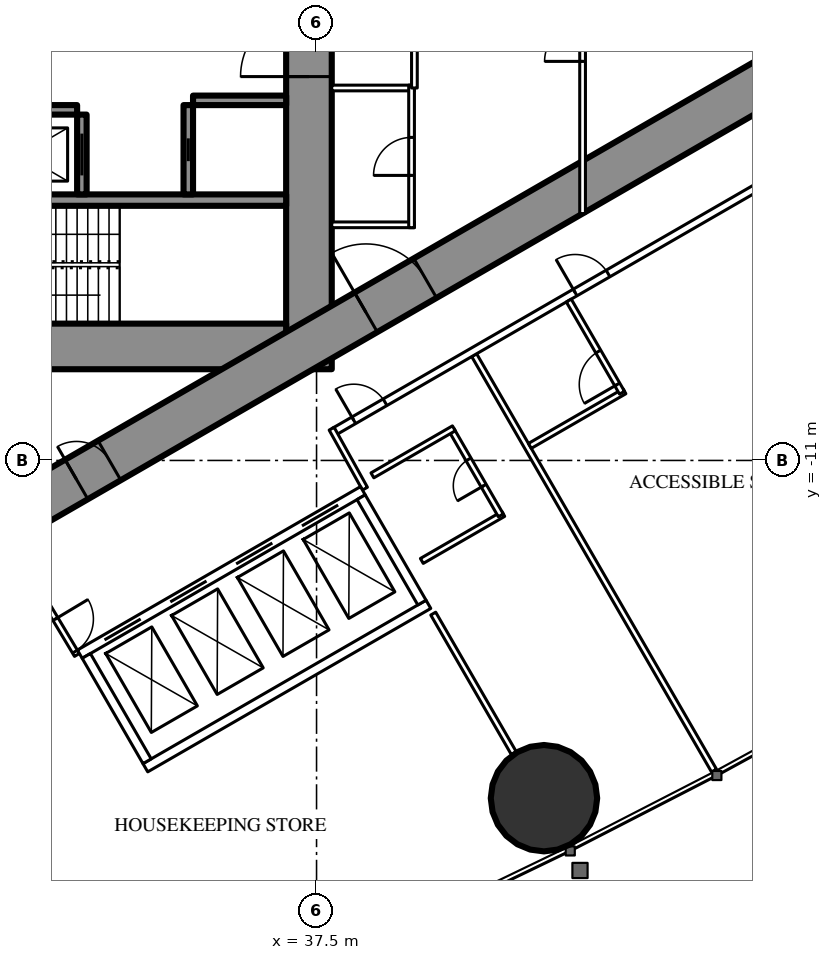
"""IFC4 building model, lengths in metres.
Left out: names, types, materials, properties, quantities, classifications, styles, units other than length and angle.
Written with IfcOpenShell. Run it as: python <this file> out.ifc"""

import sys

from ifc_helpers import new_model, si_unit, direction, frame, frame_2d, origin, origin_2d, place, context, subcontext, project, spatial, rectangle, hollow_circle, extrude, element, fill, save


model = new_model("IFC4")
c1 = context("Model", 3, precision=1e-05, world=origin(), true_north=direction((0.0, 1.0)))
c2 = subcontext(c1, "Body", "Model", "MODEL_VIEW")
j1 = project(units=[si_unit("LENGTHUNIT", "METRE"), si_unit("PLANEANGLEUNIT", "RADIAN")], contexts=[c1])
p1 = place(None, origin())
s1 = spatial("IfcSite", under=j1, at=p1, CompositionType="ELEMENT")
p2 = place(p1, origin())
s2 = spatial("IfcBuilding", under=s1, at=p2, CompositionType="ELEMENT")
p3 = place(p2, frame((0.0, 0.0, 39.0)))
s3 = spatial("IfcBuildingStorey", under=s2, at=p3, CompositionType="ELEMENT", Elevation=39.0)
p4 = place(p3, frame((43.484, -19.886, 0.0), z_axis=(0.0, 0.0, 1.0), x_axis=(1.0, 0.0, 0.0)))
e1 = element("IfcColumn", 1, at=p4, inside=s3, PredefinedType="COLUMN", context=c2, shape_type="SweptSolid", body=[
    extrude(hollow_circle(Radius=1.4, WallThickness=0.12, at=origin_2d()), origin(), (0.0, 0.0, 1.0), 3.5),
])
p5 = place(p3, frame((37.3, -8.6, 0.0), z_axis=(0.0, 0.0, 1.0), x_axis=(0.0, 1.0, 0.0)))
e2 = element("IfcWall", 2, at=p5, inside=s3, PredefinedType="SHEAR", context=c2, shape_type="SweptSolid", body=[
    extrude(rectangle(XDim=17.2, YDim=1.2, at=frame_2d((8.6, 0.0))), origin(), (0.0, 0.0, 1.0), 3.5),
])
p6 = place(p5, frame((7.7, 0.0, 0.0)))
e3 = element("IfcOpeningElement", 3, at=p6, cuts=e2, PredefinedType="OPENING", context=c2, shape_type="SweptSolid", body=[
    extrude(rectangle(XDim=1.8, YDim=2.2, at=frame_2d((0.9, 1.1))), frame((0.0, 0.61, 0.0), z_axis=(0.0, -1.0, 0.0), x_axis=(1.0, 0.0, 0.0)), (0.0, 0.0, 1.0), 1.22),
])
p7 = place(p3, frame((28.3, -8.0, 0.0), z_axis=(0.0, 0.0, 1.0), x_axis=(1.0, 0.0, 0.0)))
e4 = element("IfcWall", 4, at=p7, inside=s3, PredefinedType="SHEAR", context=c2, shape_type="SweptSolid", body=[
    extrude(rectangle(XDim=8.4, YDim=1.2, at=frame_2d((4.2, 0.0))), origin(), (0.0, 0.0, 1.0), 3.5),
])
p8 = place(p7, frame((0.25, 0.0, 0.0)))
e5 = element("IfcOpeningElement", 5, at=p8, cuts=e4, PredefinedType="OPENING", context=c2, shape_type="SweptSolid", body=[
    extrude(rectangle(XDim=1.0, YDim=2.2, at=frame_2d((0.5, 1.1))), frame((0.0, 0.61, 0.0), z_axis=(0.0, -1.0, 0.0), x_axis=(1.0, 0.0, 0.0)), (0.0, 0.0, 1.0), 1.22),
])
p9 = place(p3, frame((28.3, -4.15, 0.0), z_axis=(0.0, 0.0, 1.0), x_axis=(1.0, 0.0, 0.0)))
e6 = element("IfcWall", 6, at=p9, inside=s3, PredefinedType="SHEAR", context=c2, shape_type="SweptSolid", body=[
    extrude(rectangle(XDim=8.4, YDim=0.3, at=frame_2d((4.2, 0.0))), origin(), (0.0, 0.0, 1.0), 3.5),
])
p10 = place(p3, frame((31.325, -4.0, 0.0), z_axis=(0.0, 0.0, 1.0), x_axis=(0.0, 1.0, 0.0)))
e7 = element("IfcWall", 7, at=p10, inside=s3, PredefinedType="SHEAR", context=c2, shape_type="SweptSolid", body=[
    extrude(rectangle(XDim=2.1, YDim=0.25, at=frame_2d((1.05, 0.0))), origin(), (0.0, 0.0, 1.0), 3.5),
])
p11 = place(p10, frame((0.5, 0.0, 0.0)))
e8 = element("IfcOpeningElement", 8, at=p11, cuts=e7, PredefinedType="OPENING", context=c2, shape_type="SweptSolid", body=[
    extrude(rectangle(XDim=1.1, YDim=2.2, at=frame_2d((0.55, 1.1))), frame((0.0, 0.135, 0.0), z_axis=(0.0, -1.0, 0.0), x_axis=(1.0, 0.0, 0.0)), (0.0, 0.0, 1.0), 0.27),
])
p12 = place(p3, frame((34.125, -4.0, 0.0), z_axis=(0.0, 0.0, 1.0), x_axis=(0.0, 1.0, 0.0)))
e9 = element("IfcWall", 9, at=p12, inside=s3, PredefinedType="SHEAR", context=c2, shape_type="SweptSolid", body=[
    extrude(rectangle(XDim=2.35, YDim=0.25, at=frame_2d((1.175, 0.0))), origin(), (0.0, 0.0, 1.0), 3.5),
])
p13 = place(p12, frame((0.875, 0.0, 0.0)))
e10 = element("IfcOpeningElement", 10, at=p13, cuts=e9, PredefinedType="OPENING", context=c2, shape_type="SweptSolid", body=[
    extrude(rectangle(XDim=0.6, YDim=2.0, at=frame_2d((0.3, 1.0))), frame((0.0, 0.135, 0.0), z_axis=(0.0, -1.0, 0.0), x_axis=(1.0, 0.0, 0.0)), (0.0, 0.0, 1.0), 0.27),
])
p14 = place(p3, frame((28.3, -1.775, 0.0), z_axis=(0.0, 0.0, 1.0), x_axis=(1.0, 0.0, 0.0)))
e11 = element("IfcWall", 11, at=p14, inside=s3, PredefinedType="SHEAR", context=c2, shape_type="SweptSolid", body=[
    extrude(rectangle(XDim=2.9, YDim=0.25, at=frame_2d((1.45, 0.0))), origin(), (0.0, 0.0, 1.0), 3.5),
])
p15 = place(p3, frame((34.25, -1.525, 0.0), z_axis=(0.0, 0.0, 1.0), x_axis=(1.0, 0.0, 0.0)))
e12 = element("IfcWall", 12, at=p15, inside=s3, PredefinedType="SHEAR", context=c2, shape_type="SweptSolid", body=[
    extrude(rectangle(XDim=2.45, YDim=0.25, at=frame_2d((1.225, 0.0))), origin(), (0.0, 0.0, 1.0), 3.5),
])
p16 = place(p3, frame((27.2, -13.8, 0.0), z_axis=(0.0, 0.0, 1.0), x_axis=(0.866027159892, 0.499996958321, 0.0)))
e13 = element("IfcWall", 13, at=p16, inside=s3, PredefinedType="SHEAR", context=c2, shape_type="SweptSolid", body=[
    extrude(rectangle(XDim=27.947, YDim=1.2, at=frame_2d((13.973, 0.0))), origin(), (0.0, 0.0, 1.0), 3.5),
])
p17 = place(p16, frame((4.6, 0.0, 0.0)))
e14 = element("IfcOpeningElement", 14, at=p17, cuts=e13, PredefinedType="OPENING", context=c2, shape_type="SweptSolid", body=[
    extrude(rectangle(XDim=1.0, YDim=2.2, at=frame_2d((0.5, 1.1))), frame((0.0, 0.61, 0.0), z_axis=(0.0, -1.0, 0.0), x_axis=(1.0, 0.0, 0.0)), (0.0, 0.0, 1.0), 1.22),
])
p18 = place(p16, frame((13.395, 0.0, 0.0)))
e15 = element("IfcOpeningElement", 15, at=p18, cuts=e13, PredefinedType="OPENING", context=c2, shape_type="SweptSolid", body=[
    extrude(rectangle(XDim=1.8, YDim=2.2, at=frame_2d((0.9, 1.1))), frame((0.0, 0.61, 0.0), z_axis=(0.0, -1.0, 0.0), x_axis=(1.0, 0.0, 0.0)), (0.0, 0.0, 1.0), 1.22),
])
p19 = place(p3, frame((41.647, -8.23, 0.0), z_axis=(0.0, 0.0, 1.0), x_axis=(0.49998590462, -0.866033541603, 0.0)))
e16 = element("IfcWall", 16, at=p19, inside=s3, PredefinedType="PARTITIONING", context=c2, shape_type="SweptSolid", body=[
    extrude(rectangle(XDim=12.621, YDim=0.15, at=frame_2d((6.311, 0.0))), origin(), (0.0, 0.0, 1.0), 3.25),
])
p20 = place(p3, frame((40.57, -15.03, 0.0), z_axis=(0.0, 0.0, 1.0), x_axis=(0.500012993597, -0.866017901798, 0.0)))
e17 = element("IfcWall", 17, at=p20, inside=s3, PredefinedType="PARTITIONING", context=c2, shape_type="SweptSolid", body=[
    extrude(rectangle(XDim=4.243, YDim=0.15, at=frame_2d((2.122, 0.0))), origin(), (0.0, 0.0, 1.0), 3.25),
])
p21 = place(p3, frame((37.96, -10.243, 0.0), z_axis=(0.0, 0.0, 1.0), x_axis=(0.866026429433, 0.499998223521, 0.0)))
e18 = element("IfcWall", 18, at=p21, inside=s3, PredefinedType="PARTITIONING", context=c2, shape_type="SweptSolid", body=[
    extrude(rectangle(XDim=20.487, YDim=0.2, at=frame_2d((10.243, 0.0))), origin(), (0.0, 0.0, 1.0), 3.25),
])
p22 = place(p21, frame((7.325, 0.0, 0.0)))
e19 = element("IfcOpeningElement", 19, at=p22, cuts=e18, PredefinedType="OPENING", context=c2, shape_type="SweptSolid", body=[
    extrude(rectangle(XDim=1.0, YDim=2.2, at=frame_2d((0.5, 1.1))), frame((0.0, 0.11, 0.0), z_axis=(0.0, -1.0, 0.0), x_axis=(1.0, 0.0, 0.0)), (0.0, 0.0, 1.0), 0.22),
])
p23 = place(p21, frame((18.937, 0.0, 0.0)))
e20 = element("IfcOpeningElement", 20, at=p23, cuts=e18, PredefinedType="OPENING", context=c2, shape_type="SweptSolid", body=[
    extrude(rectangle(XDim=0.95, YDim=2.2, at=frame_2d((0.475, 1.1))), frame((0.0, 0.11, 0.0), z_axis=(0.0, -1.0, 0.0), x_axis=(1.0, 0.0, 0.0)), (0.0, 0.0, 1.0), 0.22),
])
p24 = place(p21, frame((0.6, 0.0, 0.0)))
e21 = element("IfcOpeningElement", 21, at=p24, cuts=e18, PredefinedType="OPENING", context=c2, shape_type="SweptSolid", body=[
    extrude(rectangle(XDim=0.95, YDim=2.2, at=frame_2d((0.475, 1.1))), frame((0.0, 0.11, 0.0), z_axis=(0.0, -1.0, 0.0), x_axis=(1.0, 0.0, 0.0)), (0.0, 0.0, 1.0), 0.22),
])
p25 = place(p3, frame((38.773, -11.742, 0.0), z_axis=(0.0, 0.0, 1.0), x_axis=(-0.485528096672, 0.8742210632, 0.0)))
e22 = element("IfcWall", 22, at=p25, inside=s3, PredefinedType="PARTITIONING", context=c2, shape_type="SweptSolid", body=[
    extrude(rectangle(XDim=1.805, YDim=0.15, at=frame_2d((0.903, 0.0))), origin(), (0.0, 0.0, 1.0), 3.25),
])
p26 = place(p3, frame((30.267, -14.569, 0.0), z_axis=(0.0, 0.0, 1.0), x_axis=(0.514336634837, -0.857588377991, 0.0)))
e23 = element("IfcWall", 23, at=p26, inside=s3, PredefinedType="PARTITIONING", context=c2, shape_type="SweptSolid", body=[
    extrude(rectangle(XDim=1.805, YDim=0.15, at=frame_2d((0.903, 0.0))), origin(), (0.0, 0.0, 1.0), 3.25),
])
p27 = place(p26, frame((0.703, 0.0, 0.0)))
e24 = element("IfcOpeningElement", 24, at=p27, cuts=e23, PredefinedType="OPENING", context=c2, shape_type="SweptSolid", body=[
    extrude(rectangle(XDim=1.0, YDim=2.2, at=frame_2d((0.5, 1.1))), frame((0.0, 0.085, 0.0), z_axis=(0.0, -1.0, 0.0), x_axis=(1.0, 0.0, 0.0)), (0.0, 0.0, 1.0), 0.17),
])
p28 = place(p3, frame((43.112, -10.617, 0.0), z_axis=(0.0, 0.0, 1.0), x_axis=(0.866018712932, 0.500011588718, 0.0)))
e25 = element("IfcWall", 25, at=p28, inside=s3, PredefinedType="PARTITIONING", context=c2, shape_type="SweptSolid", body=[
    extrude(rectangle(XDim=2.875, YDim=0.15, at=frame_2d((1.438, 0.0))), origin(), (0.0, 0.0, 1.0), 3.25),
])
p29 = place(p3, frame((44.137, -6.792, 0.0), z_axis=(0.0, 0.0, 1.0), x_axis=(0.49994636267, -0.866056369097, 0.0)))
e26 = element("IfcWall", 26, at=p29, inside=s3, PredefinedType="PARTITIONING", context=c2, shape_type="SweptSolid", body=[
    extrude(rectangle(XDim=2.8, YDim=0.15, at=frame_2d((1.4, 0.0))), origin(), (0.0, 0.0, 1.0), 3.25),
])
p30 = place(p29, frame((1.55, 0.0, 0.0)))
e27 = element("IfcOpeningElement", 27, at=p30, cuts=e26, PredefinedType="OPENING", context=c2, shape_type="SweptSolid", body=[
    extrude(rectangle(XDim=1.0, YDim=2.2, at=frame_2d((0.5, 1.1))), frame((0.0, 0.085, 0.0), z_axis=(0.0, -1.0, 0.0), x_axis=(1.0, 0.0, 0.0)), (0.0, 0.0, 1.0), 0.17),
])
p31 = place(p3, frame((40.27, -13.644, 0.0), z_axis=(0.0, 0.0, 1.0), x_axis=(0.866031185235, 0.4999899861, 0.0)))
e28 = element("IfcWall", 28, at=p31, inside=s3, PredefinedType="PARTITIONING", context=c2, shape_type="SweptSolid", body=[
    extrude(rectangle(XDim=2.475, YDim=0.15, at=frame_2d((1.238, 0.0))), origin(), (0.0, 0.0, 1.0), 3.25),
])
p32 = place(p3, frame((41.048, -10.193, 0.0), z_axis=(0.0, 0.0, 1.0), x_axis=(0.500047596559, -0.865997922154, 0.0)))
e29 = element("IfcWall", 29, at=p32, inside=s3, PredefinedType="PARTITIONING", context=c2, shape_type="SweptSolid", body=[
    extrude(rectangle(XDim=2.6, YDim=0.15, at=frame_2d((1.3, 0.0))), origin(), (0.0, 0.0, 1.0), 3.25),
])
p33 = place(p32, frame((0.9, 0.0, 0.0)))
e30 = element("IfcOpeningElement", 30, at=p33, cuts=e29, PredefinedType="OPENING", context=c2, shape_type="SweptSolid", body=[
    extrude(rectangle(XDim=0.8, YDim=2.2, at=frame_2d((0.4, 1.1))), frame((0.0, 0.085, 0.0), z_axis=(0.0, -1.0, 0.0), x_axis=(1.0, 0.0, 0.0)), (0.0, 0.0, 1.0), 0.17),
])
p34 = place(p3, frame((38.97, -11.393, 0.0), z_axis=(0.0, 0.0, 1.0), x_axis=(0.866031185235, 0.4999899861, 0.0)))
e31 = element("IfcWall", 31, at=p34, inside=s3, PredefinedType="PARTITIONING", context=c2, shape_type="SweptSolid", body=[
    extrude(rectangle(XDim=2.475, YDim=0.15, at=frame_2d((1.238, 0.0))), origin(), (0.0, 0.0, 1.0), 3.25),
])
for number, where, z_axis, x_axis in (
    (32, (37.9, -1.2, 0.0), (0.0, 0.0, 1.0), (1.0, 0.0, 0.0)),
    (33, (37.9, -4.8, 0.0), (0.0, 0.0, 1.0), (1.0, 0.0, 0.0)),
):
    element("IfcWall", number, at=place(p3, frame(where, z_axis=z_axis, x_axis=x_axis)), inside=s3, PredefinedType="PARTITIONING", context=c2, shape_type="SweptSolid", body=[
        extrude(rectangle(XDim=2.175, YDim=0.15, at=frame_2d((1.087, 0.0))), origin(), (0.0, 0.0, 1.0), 3.25),
    ])
p35 = place(p3, frame((40.0, -4.875, 0.0), z_axis=(0.0, 0.0, 1.0), x_axis=(0.0, 1.0, 0.0)))
e34 = element("IfcWall", 34, at=p35, inside=s3, PredefinedType="PARTITIONING", context=c2, shape_type="SweptSolid", body=[
    extrude(rectangle(XDim=3.75, YDim=0.15, at=frame_2d((1.875, 0.0))), origin(), (0.0, 0.0, 1.0), 3.25),
])
p36 = place(p35, frame((1.375, 0.0, 0.0)))
e35 = element("IfcOpeningElement", 35, at=p36, cuts=e34, PredefinedType="OPENING", context=c2, shape_type="SweptSolid", body=[
    extrude(rectangle(XDim=1.0, YDim=2.2, at=frame_2d((0.5, 1.1))), frame((0.0, 0.085, 0.0), z_axis=(0.0, -1.0, 0.0), x_axis=(1.0, 0.0, 0.0)), (0.0, 0.0, 1.0), 0.17),
])
p37 = place(p3, frame((40.075, -1.2, 0.0), z_axis=(0.0, 0.0, 1.0), x_axis=(0.0, 1.0, 0.0)))
e36 = element("IfcWall", 36, at=p37, inside=s3, PredefinedType="PARTITIONING", context=c2, shape_type="SweptSolid", body=[
    extrude(rectangle(XDim=6.874, YDim=0.15, at=frame_2d((3.437, 0.0))), origin(), (0.0, 0.0, 1.0), 3.25),
])
p38 = place(p37, frame((2.537, 0.0, 0.0)))
e37 = element("IfcOpeningElement", 37, at=p38, cuts=e36, PredefinedType="OPENING", context=c2, shape_type="SweptSolid", body=[
    extrude(rectangle(XDim=1.8, YDim=2.2, at=frame_2d((0.9, 1.1))), frame((0.0, 0.085, 0.0), z_axis=(0.0, -1.0, 0.0), x_axis=(1.0, 0.0, 0.0)), (0.0, 0.0, 1.0), 0.17),
])
p39 = place(p3, frame((44.5, -4.505, 0.0), z_axis=(0.0, 0.0, 1.0), x_axis=(0.0, 1.0, 0.0)))
e38 = element("IfcWall", 38, at=p39, inside=s3, PredefinedType="PARTITIONING", context=c2, shape_type="SweptSolid", body=[
    extrude(rectangle(XDim=9.009, YDim=0.15, at=frame_2d((4.505, 0.0))), origin(), (0.0, 0.0, 1.0), 2.45),
])
p40 = place(p39, frame((4.005, 0.0, 0.0)))
e39 = element("IfcOpeningElement", 39, at=p40, cuts=e38, PredefinedType="OPENING", context=c2, shape_type="SweptSolid", body=[
    extrude(rectangle(XDim=1.0, YDim=2.2, at=frame_2d((0.5, 1.1))), frame((0.0, 0.085, 0.0), z_axis=(0.0, -1.0, 0.0), x_axis=(1.0, 0.0, 0.0)), (0.0, 0.0, 1.0), 0.17),
])
p41 = place(p3, frame((31.271, -16.097, 0.0), z_axis=(0.0, 0.0, 1.0), x_axis=(0.86604045752, 0.499973925258, 0.0)))
e40 = element("IfcWall", 40, at=p41, inside=s3, PredefinedType="PARTITIONING", context=c2, shape_type="SweptSolid", body=[
    extrude(rectangle(XDim=8.6, YDim=0.25, at=frame_2d((4.3, 0.0))), origin(), (0.0, 0.0, 1.0), 3.25),
])
p42 = place(p41, frame((0.75, 0.0, 0.0)))
e41 = element("IfcOpeningElement", 41, at=p42, cuts=e40, PredefinedType="OPENING", context=c2, shape_type="SweptSolid", body=[
    extrude(rectangle(XDim=1.1, YDim=2.2, at=frame_2d((0.55, 1.1))), frame((0.0, 0.135, 0.0), z_axis=(0.0, -1.0, 0.0), x_axis=(1.0, 0.0, 0.0)), (0.0, 0.0, 1.0), 0.27),
])
p43 = place(p41, frame((2.75, 0.0, 0.0)))
e42 = element("IfcOpeningElement", 42, at=p43, cuts=e40, PredefinedType="OPENING", context=c2, shape_type="SweptSolid", body=[
    extrude(rectangle(XDim=1.1, YDim=2.2, at=frame_2d((0.55, 1.1))), frame((0.0, 0.135, 0.0), z_axis=(0.0, -1.0, 0.0), x_axis=(1.0, 0.0, 0.0)), (0.0, 0.0, 1.0), 0.27),
])
p44 = place(p41, frame((4.75, 0.0, 0.0)))
e43 = element("IfcOpeningElement", 43, at=p44, cuts=e40, PredefinedType="OPENING", context=c2, shape_type="SweptSolid", body=[
    extrude(rectangle(XDim=1.1, YDim=2.2, at=frame_2d((0.55, 1.1))), frame((0.0, 0.135, 0.0), z_axis=(0.0, -1.0, 0.0), x_axis=(1.0, 0.0, 0.0)), (0.0, 0.0, 1.0), 0.27),
])
p45 = place(p41, frame((6.75, 0.0, 0.0)))
e44 = element("IfcOpeningElement", 44, at=p45, cuts=e40, PredefinedType="OPENING", context=c2, shape_type="SweptSolid", body=[
    extrude(rectangle(XDim=1.1, YDim=2.2, at=frame_2d((0.55, 1.1))), frame((0.0, 0.135, 0.0), z_axis=(0.0, -1.0, 0.0), x_axis=(1.0, 0.0, 0.0)), (0.0, 0.0, 1.0), 0.27),
])
p46 = place(p3, frame((32.996, -19.086, 0.0), z_axis=(0.0, 0.0, 1.0), x_axis=(0.866028165386, 0.499995216735, 0.0)))
e45 = element("IfcWall", 45, at=p46, inside=s3, PredefinedType="PARTITIONING", context=c2, shape_type="SweptSolid", body=[
    extrude(rectangle(XDim=8.6, YDim=0.25, at=frame_2d((4.3, 0.0))), origin(), (0.0, 0.0, 1.0), 3.25),
])
for number, where, z_axis, x_axis in (
    (46, (31.441, -16.143, 0.0), (0.0, 0.0, 1.0), (0.5, -0.866, 0.0)),
    (47, (38.673, -11.968, 0.0), (0.0, 0.0, 1.0), (0.5, -0.866, 0.0)),
):
    element("IfcWall", number, at=place(p3, frame(where, z_axis=z_axis, x_axis=x_axis)), inside=s3, PredefinedType="PARTITIONING", context=c2, shape_type="SweptSolid", body=[
        extrude(rectangle(XDim=3.201, YDim=0.25, at=frame_2d((1.6, 0.0))), origin(), (0.0, 0.0, 1.0), 3.25),
    ])
p47 = place(p30, origin())
e48 = element("IfcDoor", 48, at=p47, inside=s3, OperationType="SINGLE_SWING_RIGHT", PredefinedType="DOOR", context=c2, shape_type="SweptSolid", body=[
    extrude(rectangle(XDim=1.0, YDim=2.2, at=frame_2d((0.5, 1.1))), frame((0.0, 0.025, 0.0), z_axis=(0.0, -1.0, 0.0), x_axis=(1.0, 0.0, 0.0)), (0.0, 0.0, 1.0), 0.05),
])
fill(e27, e48)
p48 = place(p22, origin())
e49 = element("IfcDoor", 49, at=p48, inside=s3, OperationType="SINGLE_SWING_LEFT", PredefinedType="DOOR", context=c2, shape_type="SweptSolid", body=[
    extrude(rectangle(XDim=1.0, YDim=2.2, at=frame_2d((0.5, 1.1))), frame((0.0, 0.025, 0.0), z_axis=(0.0, -1.0, 0.0), x_axis=(1.0, 0.0, 0.0)), (0.0, 0.0, 1.0), 0.05),
])
fill(e19, e49)
p49 = place(p33, origin())
e50 = element("IfcDoor", 50, at=p49, inside=s3, OperationType="SINGLE_SWING_RIGHT", PredefinedType="DOOR", context=c2, shape_type="SweptSolid", body=[
    extrude(rectangle(XDim=0.8, YDim=2.2, at=frame_2d((0.4, 1.1))), frame((0.0, 0.025, 0.0), z_axis=(0.0, -1.0, 0.0), x_axis=(1.0, 0.0, 0.0)), (0.0, 0.0, 1.0), 0.05),
])
fill(e30, e50)
p50 = place(p24, origin())
e51 = element("IfcDoor", 51, at=p50, inside=s3, OperationType="SINGLE_SWING_LEFT", PredefinedType="DOOR", context=c2, shape_type="SweptSolid", body=[
    extrude(rectangle(XDim=0.95, YDim=2.2, at=frame_2d((0.475, 1.1))), frame((0.0, 0.025, 0.0), z_axis=(0.0, -1.0, 0.0), x_axis=(1.0, 0.0, 0.0)), (0.0, 0.0, 1.0), 0.05),
])
fill(e21, e51)
p51 = place(p27, origin())
e52 = element("IfcDoor", 52, at=p51, inside=s3, OperationType="SINGLE_SWING_LEFT", PredefinedType="DOOR", context=c2, shape_type="SweptSolid", body=[
    extrude(rectangle(XDim=1.0, YDim=2.2, at=frame_2d((0.5, 1.1))), frame((0.0, 0.025, 0.0), z_axis=(0.0, -1.0, 0.0), x_axis=(1.0, 0.0, 0.0)), (0.0, 0.0, 1.0), 0.05),
])
fill(e24, e52)
p52 = place(p36, origin())
e53 = element("IfcDoor", 53, at=p52, inside=s3, OperationType="SINGLE_SWING_LEFT", PredefinedType="DOOR", context=c2, shape_type="SweptSolid", body=[
    extrude(rectangle(XDim=1.0, YDim=2.2, at=frame_2d((0.5, 1.1))), frame((0.0, 0.025, 0.0), z_axis=(0.0, -1.0, 0.0), x_axis=(1.0, 0.0, 0.0)), (0.0, 0.0, 1.0), 0.05),
])
fill(e35, e53)
p53 = place(p40, origin())
e54 = element("IfcDoor", 54, at=p53, inside=s3, OperationType="SINGLE_SWING_LEFT", PredefinedType="DOOR", context=c2, shape_type="SweptSolid", body=[
    extrude(rectangle(XDim=1.0, YDim=2.2, at=frame_2d((0.5, 1.1))), frame((0.0, 0.025, 0.0), z_axis=(0.0, -1.0, 0.0), x_axis=(1.0, 0.0, 0.0)), (0.0, 0.0, 1.0), 0.05),
])
fill(e39, e54)
p54 = place(p17, origin())
e55 = element("IfcDoor", 55, at=p54, inside=s3, OperationType="SINGLE_SWING_LEFT", PredefinedType="DOOR", context=c2, shape_type="SweptSolid", body=[
    extrude(rectangle(XDim=1.0, YDim=2.2, at=frame_2d((0.5, 1.1))), frame((0.0, 0.025, 0.0), z_axis=(0.0, -1.0, 0.0), x_axis=(1.0, 0.0, 0.0)), (0.0, 0.0, 1.0), 0.05),
])
fill(e14, e55)
p55 = place(p18, origin())
e56 = element("IfcDoor", 56, at=p55, inside=s3, OperationType="DOUBLE_DOOR_SINGLE_SWING", PredefinedType="DOOR", context=c2, shape_type="SweptSolid", body=[
    extrude(rectangle(XDim=1.8, YDim=2.2, at=frame_2d((0.9, 1.1))), frame((0.0, 0.025, 0.0), z_axis=(0.0, -1.0, 0.0), x_axis=(1.0, 0.0, 0.0)), (0.0, 0.0, 1.0), 0.05),
])
fill(e15, e56)
p56 = place(p6, origin())
e57 = element("IfcDoor", 57, at=p56, inside=s3, OperationType="DOUBLE_DOOR_SINGLE_SWING", PredefinedType="DOOR", context=c2, shape_type="SweptSolid", body=[
    extrude(rectangle(XDim=1.8, YDim=2.2, at=frame_2d((0.9, 1.1))), frame((0.0, 0.025, 0.0), z_axis=(0.0, -1.0, 0.0), x_axis=(1.0, 0.0, 0.0)), (0.0, 0.0, 1.0), 0.05),
])
fill(e3, e57)
p57 = place(p11, origin())
e58 = element("IfcDoor", 58, at=p57, inside=s3, OperationType="SLIDING_TO_LEFT", PredefinedType="USERDEFINED", context=c2, shape_type="SweptSolid", body=[
    extrude(rectangle(XDim=1.1, YDim=2.2, at=frame_2d((0.55, 1.1))), frame((0.0, 0.025, 0.0), z_axis=(0.0, -1.0, 0.0), x_axis=(1.0, 0.0, 0.0)), (0.0, 0.0, 1.0), 0.05),
])
fill(e8, e58)
p58 = place(p13, origin())
e59 = element("IfcDoor", 59, at=p58, inside=s3, OperationType="SLIDING_TO_LEFT", PredefinedType="DOOR", context=c2, shape_type="SweptSolid", body=[
    extrude(rectangle(XDim=0.6, YDim=2.0, at=frame_2d((0.3, 1.0))), frame((0.0, 0.025, 0.0), z_axis=(0.0, -1.0, 0.0), x_axis=(1.0, 0.0, 0.0)), (0.0, 0.0, 1.0), 0.05),
])
fill(e10, e59)
p59 = place(p42, origin())
e60 = element("IfcDoor", 60, at=p59, inside=s3, OperationType="DOUBLE_DOOR_SLIDING", PredefinedType="USERDEFINED", context=c2, shape_type="SweptSolid", body=[
    extrude(rectangle(XDim=1.1, YDim=2.2, at=frame_2d((0.55, 1.1))), frame((0.0, 0.025, 0.0), z_axis=(0.0, -1.0, 0.0), x_axis=(1.0, 0.0, 0.0)), (0.0, 0.0, 1.0), 0.05),
])
fill(e41, e60)
p60 = place(p43, origin())
e61 = element("IfcDoor", 61, at=p60, inside=s3, OperationType="DOUBLE_DOOR_SLIDING", PredefinedType="USERDEFINED", context=c2, shape_type="SweptSolid", body=[
    extrude(rectangle(XDim=1.1, YDim=2.2, at=frame_2d((0.55, 1.1))), frame((0.0, 0.025, 0.0), z_axis=(0.0, -1.0, 0.0), x_axis=(1.0, 0.0, 0.0)), (0.0, 0.0, 1.0), 0.05),
])
fill(e42, e61)
p61 = place(p44, origin())
e62 = element("IfcDoor", 62, at=p61, inside=s3, OperationType="DOUBLE_DOOR_SLIDING", PredefinedType="USERDEFINED", context=c2, shape_type="SweptSolid", body=[
    extrude(rectangle(XDim=1.1, YDim=2.2, at=frame_2d((0.55, 1.1))), frame((0.0, 0.025, 0.0), z_axis=(0.0, -1.0, 0.0), x_axis=(1.0, 0.0, 0.0)), (0.0, 0.0, 1.0), 0.05),
])
fill(e43, e62)
p62 = place(p45, origin())
e63 = element("IfcDoor", 63, at=p62, inside=s3, OperationType="DOUBLE_DOOR_SLIDING", PredefinedType="USERDEFINED", context=c2, shape_type="SweptSolid", body=[
    extrude(rectangle(XDim=1.1, YDim=2.2, at=frame_2d((0.55, 1.1))), frame((0.0, 0.025, 0.0), z_axis=(0.0, -1.0, 0.0), x_axis=(1.0, 0.0, 0.0)), (0.0, 0.0, 1.0), 0.05),
])
fill(e44, e63)
save(model, sys.argv[1])
